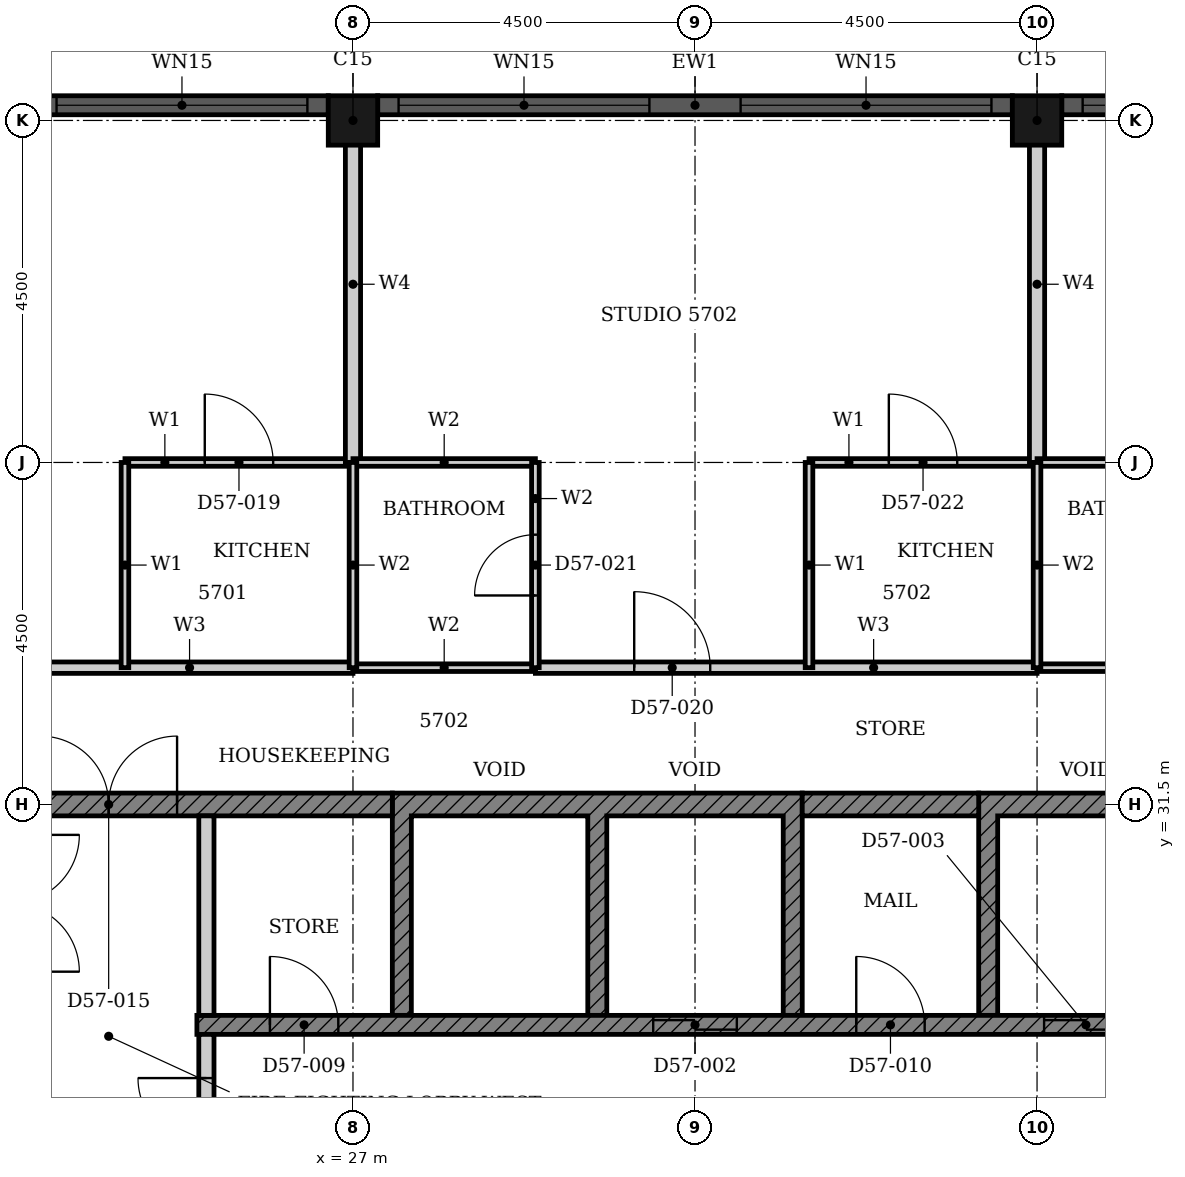
"""IFC4 building model, lengths in metres.
Left out: names, types, materials, properties, quantities, classifications, styles, units other than length and angle.
Written with IfcOpenShell. Run it as: python <this file> out.ifc"""

import sys

from ifc_helpers import new_model, si_unit, direction, frame, frame_2d, origin, origin_2d, place, context, subcontext, project, spatial, polyline, rectangle, hollow_rectangle, outline, extrude, element, fill, save


model = new_model("IFC4")
c1 = context("Model", 3, precision=1e-05, world=origin(), true_north=direction((0.0, 1.0)))
c2 = subcontext(c1, "Body", "Model", "MODEL_VIEW")
j1 = project(units=[si_unit("LENGTHUNIT", "METRE"), si_unit("PLANEANGLEUNIT", "RADIAN")], contexts=[c1])
p1 = place(None, origin())
s1 = spatial("IfcSite", under=j1, at=p1, CompositionType="ELEMENT")
p2 = place(p1, origin())
s2 = spatial("IfcBuilding", under=s1, at=p2, CompositionType="ELEMENT")
p3 = place(p2, frame((0.0, 0.0, 225.7)))
s3 = spatial("IfcBuildingStorey", under=s2, at=p3, CompositionType="ELEMENT", Elevation=225.7)
for number, where, z_axis, x_axis in (
    (1, (36.0, 40.5, 0.0), (0.0, 0.0, 1.0), (1.0, 0.0, 0.0)),
    (2, (27.0, 40.5, 0.0), (0.0, 0.0, 1.0), (1.0, 0.0, 0.0)),
):
    element("IfcColumn", number, at=place(p3, frame(where, z_axis=z_axis, x_axis=x_axis)), inside=s3, PredefinedType="COLUMN", context=c2, shape_type="SweptSolid", body=[
        extrude(hollow_rectangle(XDim=0.65, YDim=0.65, WallThickness=0.021, at=origin_2d()), origin(), (0.0, 0.0, 1.0), 3.7),
    ])
p4 = place(p3, frame((44.675, 40.7, 0.0), z_axis=(0.0, 0.0, 1.0), x_axis=(-1.0, 0.0, 0.0)))
e3 = element("IfcWall", 3, at=p4, inside=s3, PredefinedType="SOLIDWALL", context=c2, shape_type="SweptSolid", body=[
    extrude(rectangle(XDim=8.35, YDim=0.25, at=frame_2d((4.175, 0.0))), origin(), (0.0, 0.0, 1.0), 3.7),
])
p5 = place(p4, frame((0.275, 0.0, 0.45)))
e4 = element("IfcOpeningElement", 4, at=p5, cuts=e3, PredefinedType="OPENING", context=c2, shape_type="SweptSolid", body=[
    extrude(rectangle(XDim=3.3, YDim=2.3, at=frame_2d((1.65, 1.15))), frame((0.0, 0.135, 0.0), z_axis=(0.0, -1.0, 0.0), x_axis=(1.0, 0.0, 0.0)), (0.0, 0.0, 1.0), 0.27),
])
p6 = place(p4, frame((4.775, 0.0, 0.45)))
e5 = element("IfcOpeningElement", 5, at=p6, cuts=e3, PredefinedType="OPENING", context=c2, shape_type="SweptSolid", body=[
    extrude(rectangle(XDim=3.3, YDim=2.3, at=frame_2d((1.65, 1.15))), frame((0.0, 0.135, 0.0), z_axis=(0.0, -1.0, 0.0), x_axis=(1.0, 0.0, 0.0)), (0.0, 0.0, 1.0), 0.27),
])
p7 = place(p3, frame((35.675, 40.7, 0.0), z_axis=(0.0, 0.0, 1.0), x_axis=(-1.0, 0.0, 0.0)))
e6 = element("IfcWall", 6, at=p7, inside=s3, PredefinedType="SOLIDWALL", context=c2, shape_type="SweptSolid", body=[
    extrude(rectangle(XDim=8.35, YDim=0.25, at=frame_2d((4.175, 0.0))), origin(), (0.0, 0.0, 1.0), 3.7),
])
p8 = place(p7, frame((0.275, 0.0, 0.45)))
e7 = element("IfcOpeningElement", 7, at=p8, cuts=e6, PredefinedType="OPENING", context=c2, shape_type="SweptSolid", body=[
    extrude(rectangle(XDim=3.3, YDim=2.3, at=frame_2d((1.65, 1.15))), frame((0.0, 0.135, 0.0), z_axis=(0.0, -1.0, 0.0), x_axis=(1.0, 0.0, 0.0)), (0.0, 0.0, 1.0), 0.27),
])
p9 = place(p7, frame((4.775, 0.0, 0.45)))
e8 = element("IfcOpeningElement", 8, at=p9, cuts=e6, PredefinedType="OPENING", context=c2, shape_type="SweptSolid", body=[
    extrude(rectangle(XDim=3.3, YDim=2.3, at=frame_2d((1.65, 1.15))), frame((0.0, 0.135, 0.0), z_axis=(0.0, -1.0, 0.0), x_axis=(1.0, 0.0, 0.0)), (0.0, 0.0, 1.0), 0.27),
])
p10 = place(p3, frame((26.675, 40.7, 0.0), z_axis=(0.0, 0.0, 1.0), x_axis=(-1.0, 0.0, 0.0)))
e9 = element("IfcWall", 9, at=p10, inside=s3, PredefinedType="SOLIDWALL", context=c2, shape_type="SweptSolid", body=[
    extrude(rectangle(XDim=8.35, YDim=0.25, at=frame_2d((4.175, 0.0))), origin(), (0.0, 0.0, 1.0), 3.7),
])
p11 = place(p10, frame((0.275, 0.0, 0.45)))
e10 = element("IfcOpeningElement", 10, at=p11, cuts=e9, PredefinedType="OPENING", context=c2, shape_type="SweptSolid", body=[
    extrude(rectangle(XDim=3.3, YDim=2.3, at=frame_2d((1.65, 1.15))), frame((0.0, 0.135, 0.0), z_axis=(0.0, -1.0, 0.0), x_axis=(1.0, 0.0, 0.0)), (0.0, 0.0, 1.0), 0.27),
])
p12 = place(p10, frame((4.775, 0.0, 0.45)))
e11 = element("IfcOpeningElement", 11, at=p12, cuts=e9, PredefinedType="OPENING", context=c2, shape_type="SweptSolid", body=[
    extrude(rectangle(XDim=3.3, YDim=2.3, at=frame_2d((1.65, 1.15))), frame((0.0, 0.135, 0.0), z_axis=(0.0, -1.0, 0.0), x_axis=(1.0, 0.0, 0.0)), (0.0, 0.0, 1.0), 0.27),
])
p13 = place(p3, origin())
e12 = element("IfcWall", 12, at=p13, inside=s3, PredefinedType="SHEAR", context=c2, shape_type="SweptSolid", body=[
    extrude(outline(polyline([(27.518, 28.725), (27.768, 28.725), (27.768, 31.35), (30.089, 31.35), (30.089, 28.725), (30.339, 28.725), (30.339, 31.35), (32.661, 31.35), (32.661, 28.725), (32.911, 28.725), (32.911, 31.65), (27.518, 31.65), (27.518, 28.725)])), origin(), (0.0, 0.0, 1.0), 3.4),
])
p14 = place(p3, origin())
e13 = element("IfcWall", 13, at=p14, inside=s3, PredefinedType="SHEAR", context=c2, shape_type="SweptSolid", body=[
    extrude(outline(polyline([(35.232, 28.725), (35.482, 28.725), (35.482, 31.35), (37.803, 31.35), (37.803, 28.725), (38.053, 28.725), (38.053, 31.35), (40.375, 31.35), (40.375, 28.725), (40.625, 28.725), (40.625, 31.65), (35.232, 31.65), (35.232, 28.725)])), origin(), (0.0, 0.0, 1.0), 3.4),
])
p15 = place(p3, frame((18.15, 31.5, 0.0), z_axis=(0.0, 0.0, 1.0), x_axis=(1.0, 0.0, 0.0)))
e14 = element("IfcWall", 14, at=p15, inside=s3, PredefinedType="SHEAR", context=c2, shape_type="SweptSolid", body=[
    extrude(rectangle(XDim=9.368, YDim=0.3, at=frame_2d((4.684, 0.0))), origin(), (0.0, 0.0, 1.0), 3.4),
])
p16 = place(p15, frame((4.736, 0.0, 0.0)))
e15 = element("IfcOpeningElement", 15, at=p16, cuts=e14, PredefinedType="OPENING", context=c2, shape_type="SweptSolid", body=[
    extrude(rectangle(XDim=1.8, YDim=2.1, at=frame_2d((0.9, 1.05))), frame((0.0, 0.16, 0.0), z_axis=(0.0, -1.0, 0.0), x_axis=(1.0, 0.0, 0.0)), (0.0, 0.0, 1.0), 0.32),
])
p17 = place(p3, frame((32.911, 31.5, 0.0), z_axis=(0.0, 0.0, 1.0), x_axis=(1.0, 0.0, 0.0)))
e16 = element("IfcWall", 16, at=p17, inside=s3, PredefinedType="SHEAR", context=c2, shape_type="SweptSolid", body=[
    extrude(rectangle(XDim=2.322, YDim=0.3, at=frame_2d((1.161, 0.0))), origin(), (0.0, 0.0, 1.0), 3.4),
])
p18 = place(p3, frame((24.947, 28.6, 0.0), z_axis=(0.0, 0.0, 1.0), x_axis=(1.0, 0.0, 0.0)))
e17 = element("IfcWall", 17, at=p18, inside=s3, PredefinedType="SHEAR", context=c2, shape_type="SweptSolid", body=[
    extrude(rectangle(XDim=15.678, YDim=0.25, at=frame_2d((7.839, 0.0))), origin(), (0.0, 0.0, 1.0), 3.4),
])
p19 = place(p18, frame((6.004, 0.0, 0.0)))
e18 = element("IfcOpeningElement", 18, at=p19, cuts=e17, PredefinedType="OPENING", context=c2, shape_type="SweptSolid", body=[
    extrude(rectangle(XDim=1.1, YDim=2.1, at=frame_2d((0.55, 1.05))), frame((0.0, 0.135, 0.0), z_axis=(0.0, -1.0, 0.0), x_axis=(1.0, 0.0, 0.0)), (0.0, 0.0, 1.0), 0.27),
])
p20 = place(p18, frame((11.146, 0.0, 0.0)))
e19 = element("IfcOpeningElement", 19, at=p20, cuts=e17, PredefinedType="OPENING", context=c2, shape_type="SweptSolid", body=[
    extrude(rectangle(XDim=1.1, YDim=2.1, at=frame_2d((0.55, 1.05))), frame((0.0, 0.135, 0.0), z_axis=(0.0, -1.0, 0.0), x_axis=(1.0, 0.0, 0.0)), (0.0, 0.0, 1.0), 0.27),
])
p21 = place(p18, frame((13.718, 0.0, 0.0)))
e20 = element("IfcOpeningElement", 20, at=p21, cuts=e17, PredefinedType="OPENING", context=c2, shape_type="SweptSolid", body=[
    extrude(rectangle(XDim=1.1, YDim=2.1, at=frame_2d((0.55, 1.05))), frame((0.0, 0.135, 0.0), z_axis=(0.0, -1.0, 0.0), x_axis=(1.0, 0.0, 0.0)), (0.0, 0.0, 1.0), 0.27),
])
p22 = place(p18, frame((0.961, 0.0, 0.0)))
e21 = element("IfcOpeningElement", 21, at=p22, cuts=e17, PredefinedType="OPENING", context=c2, shape_type="SweptSolid", body=[
    extrude(rectangle(XDim=0.9, YDim=2.1, at=frame_2d((0.45, 1.05))), frame((0.0, 0.135, 0.0), z_axis=(0.0, -1.0, 0.0), x_axis=(1.0, 0.0, 0.0)), (0.0, 0.0, 1.0), 0.27),
])
p23 = place(p18, frame((8.675, 0.0, 0.0)))
e22 = element("IfcOpeningElement", 22, at=p23, cuts=e17, PredefinedType="OPENING", context=c2, shape_type="SweptSolid", body=[
    extrude(rectangle(XDim=0.9, YDim=2.1, at=frame_2d((0.45, 1.05))), frame((0.0, 0.135, 0.0), z_axis=(0.0, -1.0, 0.0), x_axis=(1.0, 0.0, 0.0)), (0.0, 0.0, 1.0), 0.27),
])
p24 = place(p3, frame((25.072, 28.725, 0.0), z_axis=(0.0, 0.0, 1.0), x_axis=(0.0, 1.0, 0.0)))
e23 = element("IfcWall", 23, at=p24, inside=s3, PredefinedType="PARTITIONING", context=c2, shape_type="SweptSolid", body=[
    extrude(rectangle(XDim=2.625, YDim=0.2, at=frame_2d((1.312, 0.0))), origin(), (0.0, 0.0, 1.0), 3.4),
])
p25 = place(p3, frame((25.072, 25.525, 0.0), z_axis=(0.0, 0.0, 1.0), x_axis=(0.0, 1.0, 0.0)))
e24 = element("IfcWall", 24, at=p25, inside=s3, PredefinedType="PARTITIONING", context=c2, shape_type="SweptSolid", body=[
    extrude(rectangle(XDim=2.95, YDim=0.2, at=frame_2d((1.475, 0.0))), origin(), (0.0, 0.0, 1.0), 3.4),
])
p26 = place(p25, frame((0.575, 0.0, 0.0)))
e25 = element("IfcOpeningElement", 25, at=p26, cuts=e24, PredefinedType="OPENING", context=c2, shape_type="SweptSolid", body=[
    extrude(rectangle(XDim=1.8, YDim=2.1, at=frame_2d((0.9, 1.05))), frame((0.0, 0.11, 0.0), z_axis=(0.0, -1.0, 0.0), x_axis=(1.0, 0.0, 0.0)), (0.0, 0.0, 1.0), 0.22),
])
p27 = place(p3, frame((20.4, 33.3, 0.0), z_axis=(0.0, 0.0, 1.0), x_axis=(1.0, 0.0, 0.0)))
e26 = element("IfcWall", 26, at=p27, inside=s3, PredefinedType="PARTITIONING", context=c2, shape_type="SweptSolid", body=[
    extrude(rectangle(XDim=6.6, YDim=0.15, at=frame_2d((3.3, 0.0))), origin(), (0.0, 0.0, 1.0), 3.4),
])
p28 = place(p27, frame((1.3, 0.0, 0.0)))
e27 = element("IfcOpeningElement", 27, at=p28, cuts=e26, PredefinedType="OPENING", context=c2, shape_type="SweptSolid", body=[
    extrude(rectangle(XDim=1.0, YDim=2.2, at=frame_2d((0.5, 1.1))), frame((0.0, 0.085, 0.0), z_axis=(0.0, -1.0, 0.0), x_axis=(1.0, 0.0, 0.0)), (0.0, 0.0, 1.0), 0.17),
])
p29 = place(p3, frame((29.4, 33.3, 0.0), z_axis=(0.0, 0.0, 1.0), x_axis=(1.0, 0.0, 0.0)))
e28 = element("IfcWall", 28, at=p29, inside=s3, PredefinedType="PARTITIONING", context=c2, shape_type="SweptSolid", body=[
    extrude(rectangle(XDim=6.6, YDim=0.15, at=frame_2d((3.3, 0.0))), origin(), (0.0, 0.0, 1.0), 3.4),
])
p30 = place(p29, frame((1.3, 0.0, 0.0)))
e29 = element("IfcOpeningElement", 29, at=p30, cuts=e28, PredefinedType="OPENING", context=c2, shape_type="SweptSolid", body=[
    extrude(rectangle(XDim=1.0, YDim=2.2, at=frame_2d((0.5, 1.1))), frame((0.0, 0.085, 0.0), z_axis=(0.0, -1.0, 0.0), x_axis=(1.0, 0.0, 0.0)), (0.0, 0.0, 1.0), 0.17),
])
p31 = place(p3, frame((24.0, 36.0, 0.0), z_axis=(0.0, 0.0, 1.0), x_axis=(1.0, 0.0, 0.0)))
e30 = element("IfcWall", 30, at=p31, inside=s3, PredefinedType="PARTITIONING", context=c2, shape_type="SweptSolid", body=[
    extrude(rectangle(XDim=3.0, YDim=0.1, at=frame_2d((1.5, 0.0))), origin(), (0.0, 0.0, 1.0), 3.4),
])
p32 = place(p31, frame((1.05, 0.0, 0.0)))
e31 = element("IfcOpeningElement", 31, at=p32, cuts=e30, PredefinedType="OPENING", context=c2, shape_type="SweptSolid", body=[
    extrude(rectangle(XDim=0.9, YDim=2.1, at=frame_2d((0.45, 1.05))), frame((0.0, 0.06, 0.0), z_axis=(0.0, -1.0, 0.0), x_axis=(1.0, 0.0, 0.0)), (0.0, 0.0, 1.0), 0.12),
])
p33 = place(p3, frame((33.0, 36.0, 0.0), z_axis=(0.0, 0.0, 1.0), x_axis=(1.0, 0.0, 0.0)))
e32 = element("IfcWall", 32, at=p33, inside=s3, PredefinedType="PARTITIONING", context=c2, shape_type="SweptSolid", body=[
    extrude(rectangle(XDim=3.0, YDim=0.1, at=frame_2d((1.5, 0.0))), origin(), (0.0, 0.0, 1.0), 3.4),
])
p34 = place(p33, frame((1.05, 0.0, 0.0)))
e33 = element("IfcOpeningElement", 33, at=p34, cuts=e32, PredefinedType="OPENING", context=c2, shape_type="SweptSolid", body=[
    extrude(rectangle(XDim=0.9, YDim=2.1, at=frame_2d((0.45, 1.05))), frame((0.0, 0.06, 0.0), z_axis=(0.0, -1.0, 0.0), x_axis=(1.0, 0.0, 0.0)), (0.0, 0.0, 1.0), 0.12),
])
for number, where, z_axis, x_axis in (
    (34, (24.0, 33.3, 0.0), (0.0, 0.0, 1.0), (0.0, 1.0, 0.0)),
    (35, (33.0, 33.3, 0.0), (0.0, 0.0, 1.0), (0.0, 1.0, 0.0)),
):
    element("IfcWall", number, at=place(p3, frame(where, z_axis=z_axis, x_axis=x_axis)), inside=s3, PredefinedType="PARTITIONING", context=c2, shape_type="SweptSolid", body=[
        extrude(rectangle(XDim=2.7, YDim=0.1, at=frame_2d((1.35, 0.0))), origin(), (0.0, 0.0, 1.0), 3.4),
    ])
for number, where, z_axis, x_axis in (
    (36, (27.0, 36.0, 0.0), (0.0, 0.0, 1.0), (0.0, 1.0, 0.0)),
    (37, (36.0, 36.0, 0.0), (0.0, 0.0, 1.0), (0.0, 1.0, 0.0)),
):
    element("IfcWall", number, at=place(p3, frame(where, z_axis=z_axis, x_axis=x_axis)), inside=s3, PredefinedType="PARTITIONING", context=c2, shape_type="SweptSolid", body=[
        extrude(rectangle(XDim=4.69, YDim=0.2, at=frame_2d((2.345, 0.0))), origin(), (0.0, 0.0, 1.0), 3.4),
    ])
for number, where, z_axis, x_axis in (
    (38, (27.0, 33.3, 0.0), (0.0, 0.0, 1.0), (1.0, 0.0, 0.0)),
    (39, (36.0, 33.3, 0.0), (0.0, 0.0, 1.0), (1.0, 0.0, 0.0)),
    (40, (27.0, 36.0, 0.0), (0.0, 0.0, 1.0), (1.0, 0.0, 0.0)),
    (41, (36.0, 36.0, 0.0), (0.0, 0.0, 1.0), (1.0, 0.0, 0.0)),
):
    element("IfcWall", number, at=place(p3, frame(where, z_axis=z_axis, x_axis=x_axis)), inside=s3, PredefinedType="PARTITIONING", context=c2, shape_type="SweptSolid", body=[
        extrude(rectangle(XDim=2.4, YDim=0.1, at=frame_2d((1.2, 0.0))), origin(), (0.0, 0.0, 1.0), 3.4),
    ])
p35 = place(p3, frame((27.0, 33.3, 0.0), z_axis=(0.0, 0.0, 1.0), x_axis=(0.0, 1.0, 0.0)))
e42 = element("IfcWall", 42, at=p35, inside=s3, PredefinedType="PARTITIONING", context=c2, shape_type="SweptSolid", body=[
    extrude(rectangle(XDim=2.7, YDim=0.1, at=frame_2d((1.35, 0.0))), origin(), (0.0, 0.0, 1.0), 3.4),
])
p36 = place(p3, frame((29.4, 33.3, 0.0), z_axis=(0.0, 0.0, 1.0), x_axis=(0.0, 1.0, 0.0)))
e43 = element("IfcWall", 43, at=p36, inside=s3, PredefinedType="PARTITIONING", context=c2, shape_type="SweptSolid", body=[
    extrude(rectangle(XDim=2.7, YDim=0.1, at=frame_2d((1.35, 0.0))), origin(), (0.0, 0.0, 1.0), 3.4),
])
p37 = place(p36, frame((0.95, 0.0, 0.0)))
e44 = element("IfcOpeningElement", 44, at=p37, cuts=e43, PredefinedType="OPENING", context=c2, shape_type="SweptSolid", body=[
    extrude(rectangle(XDim=0.8, YDim=2.1, at=frame_2d((0.4, 1.05))), frame((0.0, 0.06, 0.0), z_axis=(0.0, -1.0, 0.0), x_axis=(1.0, 0.0, 0.0)), (0.0, 0.0, 1.0), 0.12),
])
p38 = place(p3, frame((36.0, 33.3, 0.0), z_axis=(0.0, 0.0, 1.0), x_axis=(0.0, 1.0, 0.0)))
e45 = element("IfcWall", 45, at=p38, inside=s3, PredefinedType="PARTITIONING", context=c2, shape_type="SweptSolid", body=[
    extrude(rectangle(XDim=2.7, YDim=0.1, at=frame_2d((1.35, 0.0))), origin(), (0.0, 0.0, 1.0), 3.4),
])
p39 = place(p6, origin())
e46 = element("IfcWindow", 46, at=p39, inside=s3, PartitioningType="SINGLE_PANEL", PredefinedType="WINDOW", context=c2, shape_type="SweptSolid", body=[
    extrude(rectangle(XDim=3.3, YDim=2.3, at=frame_2d((1.65, 1.15))), frame((0.0, 0.03, 0.0), z_axis=(0.0, -1.0, 0.0), x_axis=(1.0, 0.0, 0.0)), (0.0, 0.0, 1.0), 0.06),
])
fill(e5, e46)
p40 = place(p8, origin())
e47 = element("IfcWindow", 47, at=p40, inside=s3, PartitioningType="SINGLE_PANEL", PredefinedType="WINDOW", context=c2, shape_type="SweptSolid", body=[
    extrude(rectangle(XDim=3.3, YDim=2.3, at=frame_2d((1.65, 1.15))), frame((0.0, 0.03, 0.0), z_axis=(0.0, -1.0, 0.0), x_axis=(1.0, 0.0, 0.0)), (0.0, 0.0, 1.0), 0.06),
])
fill(e7, e47)
p41 = place(p9, origin())
e48 = element("IfcWindow", 48, at=p41, inside=s3, PartitioningType="SINGLE_PANEL", PredefinedType="WINDOW", context=c2, shape_type="SweptSolid", body=[
    extrude(rectangle(XDim=3.3, YDim=2.3, at=frame_2d((1.65, 1.15))), frame((0.0, 0.03, 0.0), z_axis=(0.0, -1.0, 0.0), x_axis=(1.0, 0.0, 0.0)), (0.0, 0.0, 1.0), 0.06),
])
fill(e8, e48)
p42 = place(p11, origin())
e49 = element("IfcWindow", 49, at=p42, inside=s3, PartitioningType="SINGLE_PANEL", PredefinedType="WINDOW", context=c2, shape_type="SweptSolid", body=[
    extrude(rectangle(XDim=3.3, YDim=2.3, at=frame_2d((1.65, 1.15))), frame((0.0, 0.03, 0.0), z_axis=(0.0, -1.0, 0.0), x_axis=(1.0, 0.0, 0.0)), (0.0, 0.0, 1.0), 0.06),
])
fill(e10, e49)
p43 = place(p19, origin())
e50 = element("IfcDoor", 50, at=p43, inside=s3, OperationType="DOUBLE_DOOR_SLIDING", PredefinedType="DOOR", context=c2, shape_type="SweptSolid", body=[
    extrude(rectangle(XDim=1.1, YDim=2.1, at=frame_2d((0.55, 1.05))), frame((0.0, 0.025, 0.0), z_axis=(0.0, -1.0, 0.0), x_axis=(1.0, 0.0, 0.0)), (0.0, 0.0, 1.0), 0.05),
])
fill(e18, e50)
p44 = place(p20, origin())
e51 = element("IfcDoor", 51, at=p44, inside=s3, OperationType="DOUBLE_DOOR_SLIDING", PredefinedType="DOOR", context=c2, shape_type="SweptSolid", body=[
    extrude(rectangle(XDim=1.1, YDim=2.1, at=frame_2d((0.55, 1.05))), frame((0.0, 0.025, 0.0), z_axis=(0.0, -1.0, 0.0), x_axis=(1.0, 0.0, 0.0)), (0.0, 0.0, 1.0), 0.05),
])
fill(e19, e51)
p45 = place(p22, origin())
e52 = element("IfcDoor", 52, at=p45, inside=s3, OperationType="SINGLE_SWING_LEFT", PredefinedType="DOOR", context=c2, shape_type="SweptSolid", body=[
    extrude(rectangle(XDim=0.9, YDim=2.1, at=frame_2d((0.45, 1.05))), frame((0.0, 0.025, 0.0), z_axis=(0.0, -1.0, 0.0), x_axis=(1.0, 0.0, 0.0)), (0.0, 0.0, 1.0), 0.05),
])
fill(e21, e52)
p46 = place(p23, origin())
e53 = element("IfcDoor", 53, at=p46, inside=s3, OperationType="SINGLE_SWING_LEFT", PredefinedType="DOOR", context=c2, shape_type="SweptSolid", body=[
    extrude(rectangle(XDim=0.9, YDim=2.1, at=frame_2d((0.45, 1.05))), frame((0.0, 0.025, 0.0), z_axis=(0.0, -1.0, 0.0), x_axis=(1.0, 0.0, 0.0)), (0.0, 0.0, 1.0), 0.05),
])
fill(e22, e53)
p47 = place(p26, origin())
e54 = element("IfcDoor", 54, at=p47, inside=s3, OperationType="DOUBLE_DOOR_SINGLE_SWING", PredefinedType="DOOR", context=c2, shape_type="SweptSolid", body=[
    extrude(rectangle(XDim=1.8, YDim=2.1, at=frame_2d((0.9, 1.05))), frame((0.0, 0.025, 0.0), z_axis=(0.0, -1.0, 0.0), x_axis=(1.0, 0.0, 0.0)), (0.0, 0.0, 1.0), 0.05),
])
fill(e25, e54)
p48 = place(p16, origin())
e55 = element("IfcDoor", 55, at=p48, inside=s3, OperationType="DOUBLE_DOOR_SINGLE_SWING", PredefinedType="DOOR", context=c2, shape_type="SweptSolid", body=[
    extrude(rectangle(XDim=1.8, YDim=2.1, at=frame_2d((0.9, 1.05))), frame((0.0, 0.025, 0.0), z_axis=(0.0, -1.0, 0.0), x_axis=(1.0, 0.0, 0.0)), (0.0, 0.0, 1.0), 0.05),
])
fill(e15, e55)
p49 = place(p32, origin())
e56 = element("IfcDoor", 56, at=p49, inside=s3, OperationType="SINGLE_SWING_LEFT", PredefinedType="DOOR", context=c2, shape_type="SweptSolid", body=[
    extrude(rectangle(XDim=0.9, YDim=2.1, at=frame_2d((0.45, 1.05))), frame((0.0, 0.025, 0.0), z_axis=(0.0, -1.0, 0.0), x_axis=(1.0, 0.0, 0.0)), (0.0, 0.0, 1.0), 0.05),
])
fill(e31, e56)
p50 = place(p30, origin())
e57 = element("IfcDoor", 57, at=p50, inside=s3, OperationType="SINGLE_SWING_RIGHT", PredefinedType="DOOR", context=c2, shape_type="SweptSolid", body=[
    extrude(rectangle(XDim=1.0, YDim=2.2, at=frame_2d((0.5, 1.1))), frame((0.0, 0.025, 0.0), z_axis=(0.0, -1.0, 0.0), x_axis=(1.0, 0.0, 0.0)), (0.0, 0.0, 1.0), 0.05),
])
fill(e29, e57)
p51 = place(p37, origin())
e58 = element("IfcDoor", 58, at=p51, inside=s3, OperationType="SINGLE_SWING_LEFT", PredefinedType="DOOR", context=c2, shape_type="SweptSolid", body=[
    extrude(rectangle(XDim=0.8, YDim=2.1, at=frame_2d((0.4, 1.05))), frame((0.0, 0.025, 0.0), z_axis=(0.0, -1.0, 0.0), x_axis=(1.0, 0.0, 0.0)), (0.0, 0.0, 1.0), 0.05),
])
fill(e44, e58)
p52 = place(p34, origin())
e59 = element("IfcDoor", 59, at=p52, inside=s3, OperationType="SINGLE_SWING_RIGHT", PredefinedType="DOOR", context=c2, shape_type="SweptSolid", body=[
    extrude(rectangle(XDim=0.9, YDim=2.1, at=frame_2d((0.45, 1.05))), frame((0.0, 0.025, 0.0), z_axis=(0.0, -1.0, 0.0), x_axis=(1.0, 0.0, 0.0)), (0.0, 0.0, 1.0), 0.05),
])
fill(e33, e59)
save(model, sys.argv[1])
